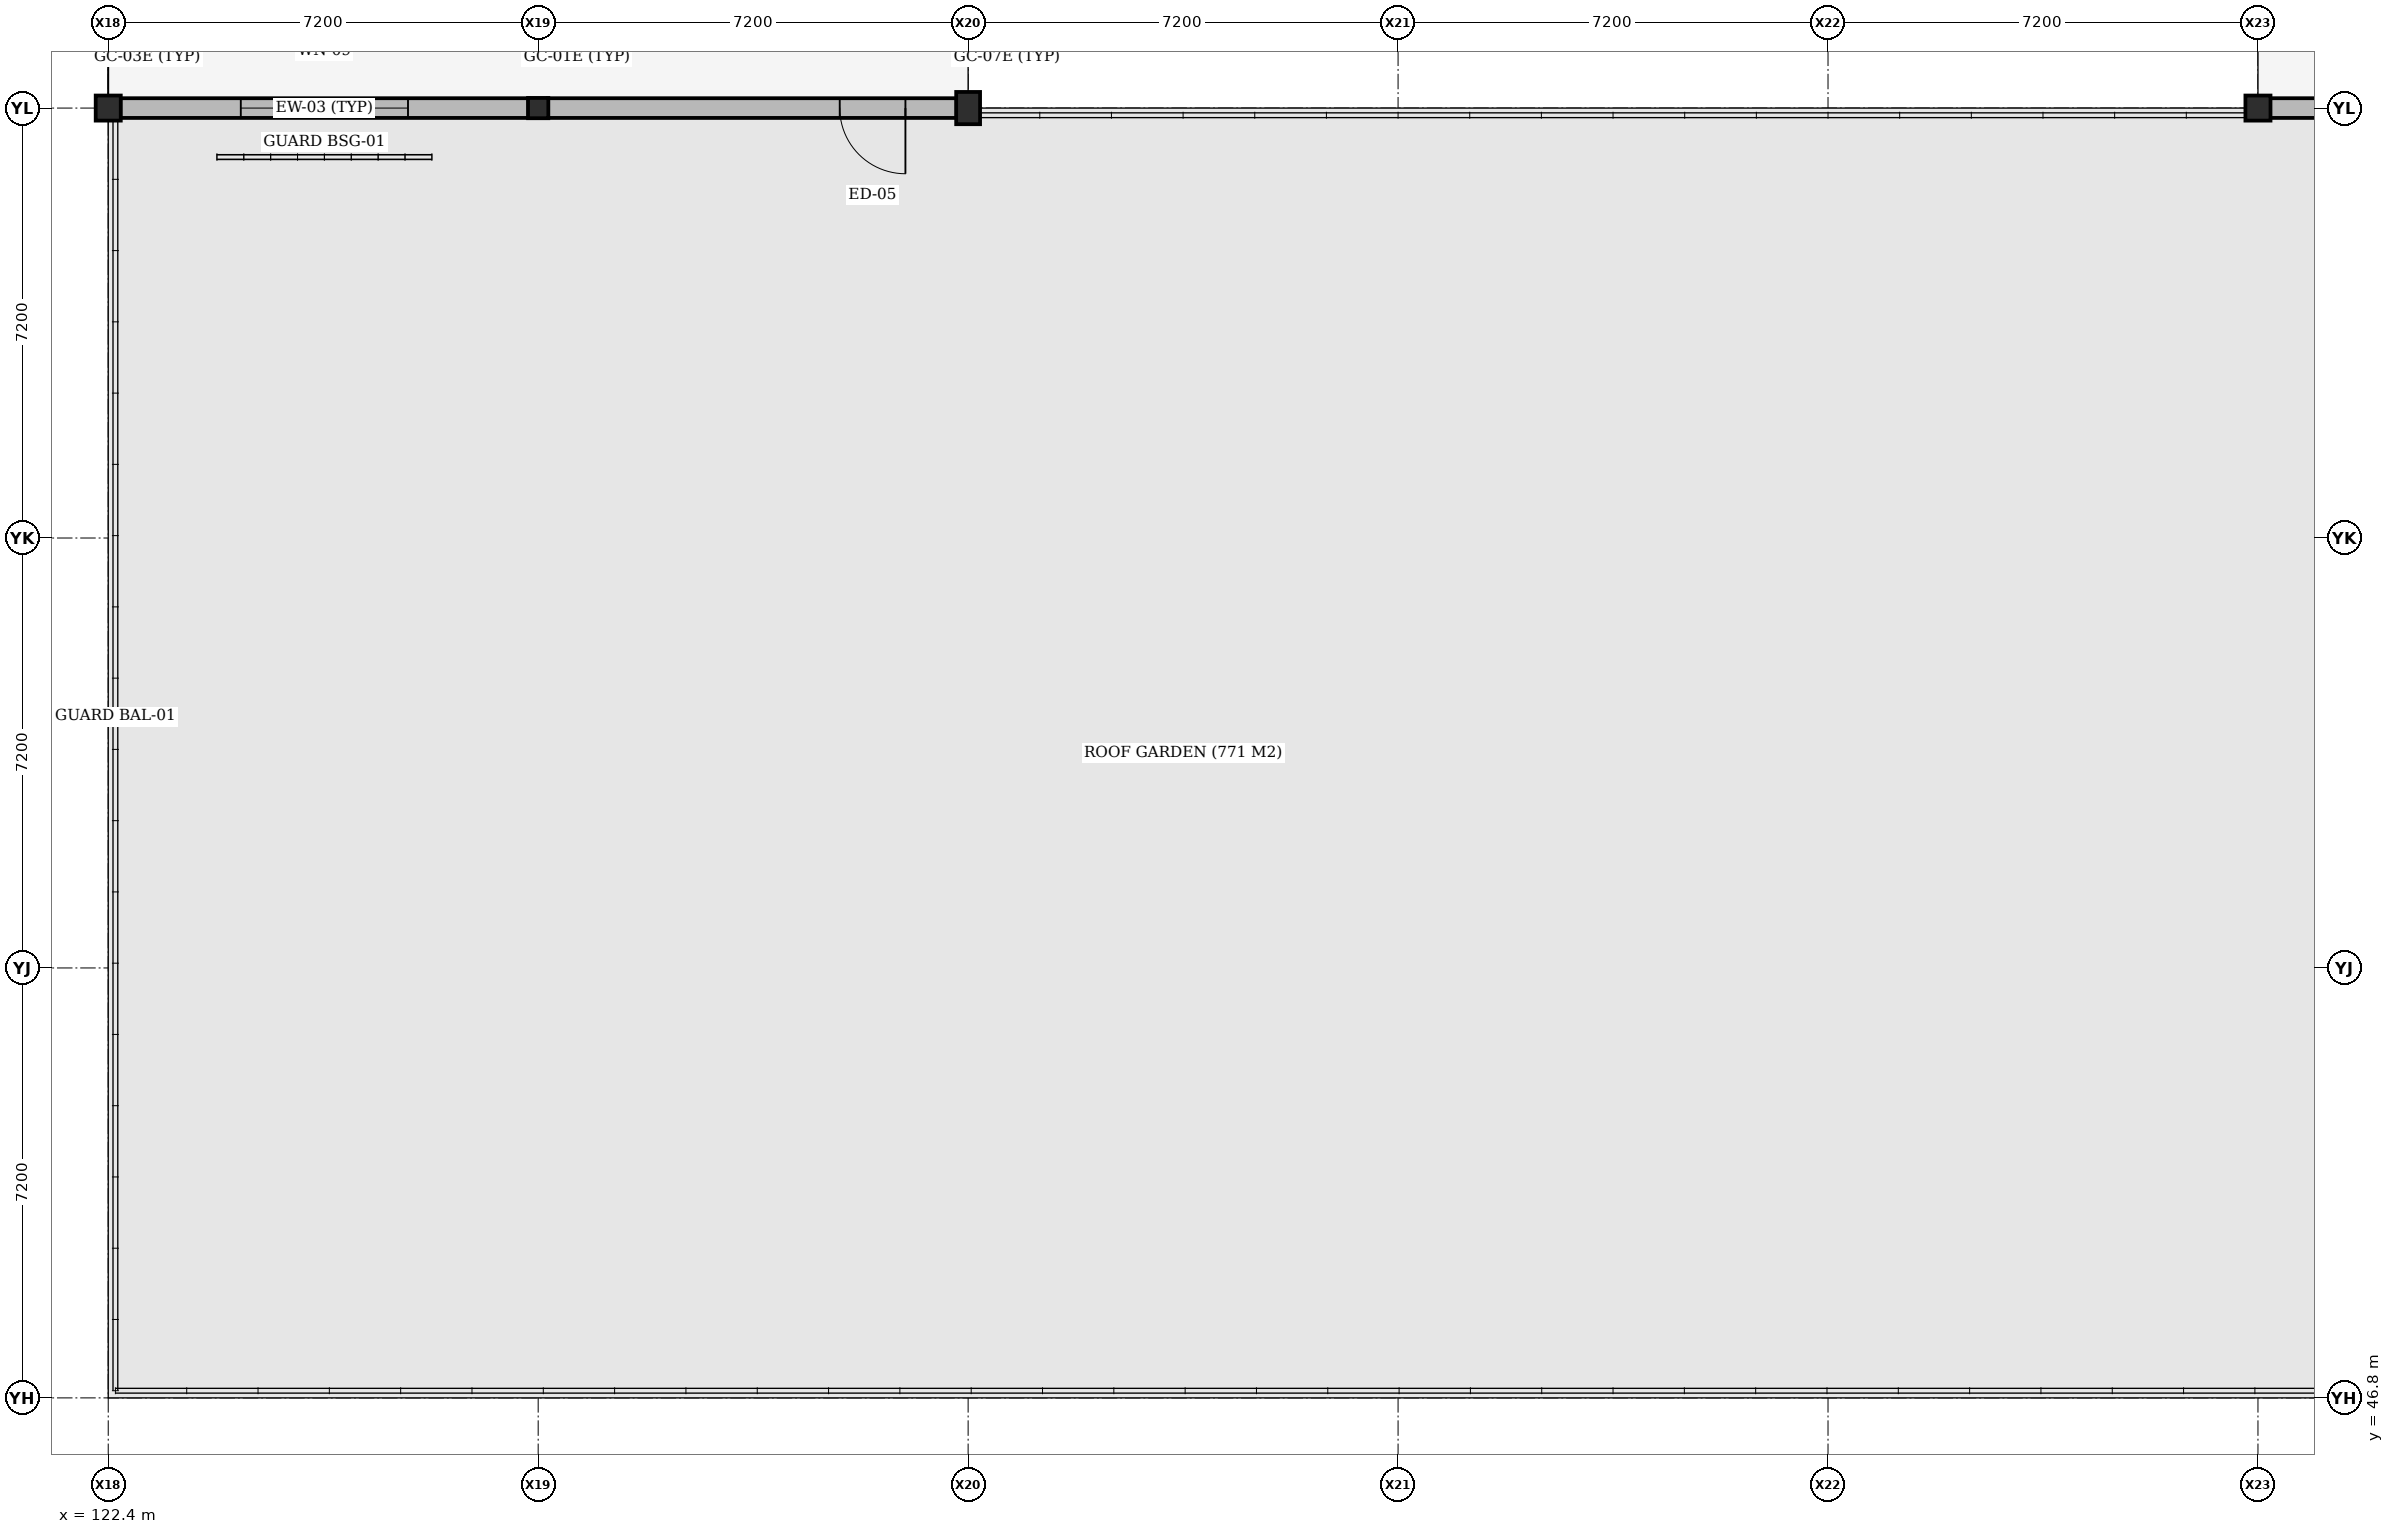
"""IFC4 building model, lengths in metres.
Left out: names, types, materials, properties, quantities, classifications, styles, units other than length and angle.
Written with IfcOpenShell. Run it as: python <this file> out.ifc"""

import sys

from ifc_helpers import new_model, si_unit, direction, frame, frame_2d, origin, origin_2d, place, context, subcontext, project, spatial, rectangle, extrude, element, fill, save


model = new_model("IFC4")
c1 = context("Model", 3, precision=1e-05, world=origin(), true_north=direction((0.0, 1.0)))
c2 = subcontext(c1, "Body", "Model", "MODEL_VIEW")
j1 = project(units=[si_unit("LENGTHUNIT", "METRE"), si_unit("PLANEANGLEUNIT", "RADIAN")], contexts=[c1])
p1 = place(None, origin())
s1 = spatial("IfcSite", under=j1, at=p1, CompositionType="ELEMENT")
p2 = place(p1, origin())
s2 = spatial("IfcBuilding", under=s1, at=p2, CompositionType="ELEMENT")
p3 = place(p2, frame((0.0, 0.0, 18.0)))
s3 = spatial("IfcBuildingStorey", under=s2, at=p3, CompositionType="ELEMENT", Elevation=18.0)
p4 = place(p3, frame((122.4, 68.4, 0.0), z_axis=(0.0, 0.0, 1.0), x_axis=(1.0, 0.0, 0.0)))
e1 = element("IfcColumn", 1, at=p4, inside=s3, PredefinedType="COLUMN", context=c2, shape_type="SweptSolid", body=[
    extrude(rectangle(XDim=0.42, YDim=0.42, at=origin_2d()), origin(), (0.0, 0.0, 1.0), 3.96),
])
p5 = place(p3, frame((129.6, 68.4, 0.0), z_axis=(0.0, 0.0, 1.0), x_axis=(1.0, 0.0, 0.0)))
e2 = element("IfcColumn", 2, at=p5, inside=s3, PredefinedType="COLUMN", context=c2, shape_type="SweptSolid", body=[
    extrude(rectangle(XDim=0.34, YDim=0.34, at=origin_2d()), origin(), (0.0, 0.0, 1.0), 3.96),
])
p6 = place(p3, frame((136.8, 68.4, 0.0), z_axis=(0.0, 0.0, 1.0), x_axis=(1.0, 0.0, 0.0)))
e3 = element("IfcColumn", 3, at=p6, inside=s3, PredefinedType="COLUMN", context=c2, shape_type="SweptSolid", body=[
    extrude(rectangle(XDim=0.4, YDim=0.54, at=origin_2d()), origin(), (0.0, 0.0, 1.0), 3.96),
])
p7 = place(p3, frame((158.4, 68.4, 0.0), z_axis=(0.0, 0.0, 1.0), x_axis=(1.0, 0.0, 0.0)))
e4 = element("IfcColumn", 4, at=p7, inside=s3, PredefinedType="COLUMN", context=c2, shape_type="SweptSolid", body=[
    extrude(rectangle(XDim=0.42, YDim=0.42, at=origin_2d()), origin(), (0.0, 0.0, 1.0), 3.96),
])
p8 = place(p3, frame((129.438, 68.4, 0.0), z_axis=(0.0, 0.0, 1.0), x_axis=(-1.0, 0.0, 0.0)))
e5 = element("IfcWall", 5, at=p8, inside=s3, PredefinedType="STANDARD", context=c2, shape_type="SweptSolid", body=[
    extrude(rectangle(XDim=6.836, YDim=0.33, at=frame_2d((3.418, 0.0))), origin(), (0.0, 0.0, 1.0), 3.96),
])
p9 = place(p8, frame((2.018, 0.0, 0.85)))
e6 = element("IfcOpeningElement", 6, at=p9, cuts=e5, PredefinedType="OPENING", context=c2, shape_type="SweptSolid", body=[
    extrude(rectangle(XDim=2.8, YDim=2.4, at=frame_2d((1.4, 1.2))), frame((0.0, 0.175, 0.0), z_axis=(0.0, -1.0, 0.0), x_axis=(1.0, 0.0, 0.0)), (0.0, 0.0, 1.0), 0.35),
])
p10 = place(p3, frame((136.608, 68.4, 0.0), z_axis=(0.0, 0.0, 1.0), x_axis=(-1.0, 0.0, 0.0)))
e7 = element("IfcWall", 7, at=p10, inside=s3, PredefinedType="STANDARD", context=c2, shape_type="SweptSolid", body=[
    extrude(rectangle(XDim=6.846, YDim=0.33, at=frame_2d((3.423, 0.0))), origin(), (0.0, 0.0, 1.0), 3.96),
])
p11 = place(p10, frame((0.858, 0.0, 0.0)))
e8 = element("IfcOpeningElement", 8, at=p11, cuts=e7, PredefinedType="OPENING", context=c2, shape_type="SweptSolid", body=[
    extrude(rectangle(XDim=1.1, YDim=2.2, at=frame_2d((0.55, 1.1))), frame((0.0, 0.175, 0.0), z_axis=(0.0, -1.0, 0.0), x_axis=(1.0, 0.0, 0.0)), (0.0, 0.0, 1.0), 0.35),
])
p12 = place(p3, frame((165.438, 68.4, 0.0), z_axis=(0.0, 0.0, 1.0), x_axis=(-1.0, 0.0, 0.0)))
e9 = element("IfcWall", 9, at=p12, inside=s3, PredefinedType="STANDARD", context=c2, shape_type="SweptSolid", body=[
    extrude(rectangle(XDim=6.836, YDim=0.33, at=frame_2d((3.418, 0.0))), origin(), (0.0, 0.0, 1.0), 3.96),
])
p13 = place(p12, frame((2.018, 0.0, 0.85)))
e10 = element("IfcOpeningElement", 10, at=p13, cuts=e9, PredefinedType="OPENING", context=c2, shape_type="SweptSolid", body=[
    extrude(rectangle(XDim=2.8, YDim=2.4, at=frame_2d((1.4, 1.2))), frame((0.0, 0.175, 0.0), z_axis=(0.0, -1.0, 0.0), x_axis=(1.0, 0.0, 0.0)), (0.0, 0.0, 1.0), 0.35),
])
p14 = place(p9, origin())
e11 = element("IfcWindow", 11, at=p14, inside=s3, PartitioningType="DOUBLE_PANEL_VERTICAL", PredefinedType="WINDOW", context=c2, shape_type="SweptSolid", body=[
    extrude(rectangle(XDim=2.8, YDim=2.4, at=frame_2d((1.4, 1.2))), frame((0.0, 0.03, 0.0), z_axis=(0.0, -1.0, 0.0), x_axis=(1.0, 0.0, 0.0)), (0.0, 0.0, 1.0), 0.06),
])
fill(e6, e11)
p15 = place(p11, origin())
e12 = element("IfcDoor", 12, at=p15, inside=s3, OperationType="SINGLE_SWING_LEFT", PredefinedType="DOOR", context=c2, shape_type="SweptSolid", body=[
    extrude(rectangle(XDim=1.1, YDim=2.2, at=frame_2d((0.55, 1.1))), frame((0.0, 0.025, 0.0), z_axis=(0.0, -1.0, 0.0), x_axis=(1.0, 0.0, 0.0)), (0.0, 0.0, 1.0), 0.05),
])
fill(e8, e12)
save(model, sys.argv[1])
